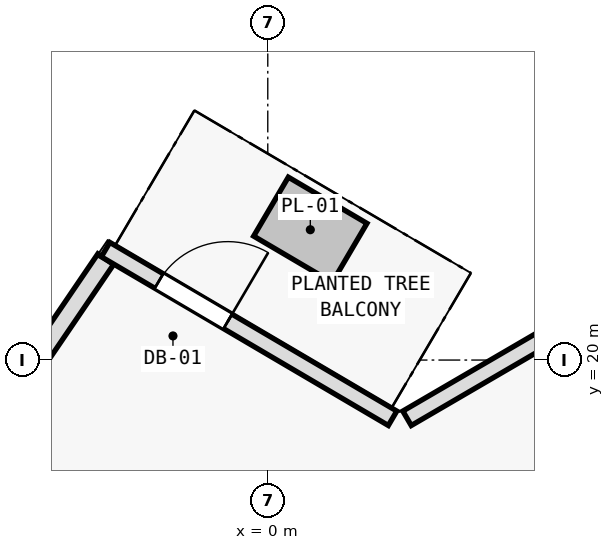
"""IFC4 building model, lengths in metres.
Left out: names, types, materials, properties, quantities, classifications, styles, units other than length and angle.
Written with IfcOpenShell. Run it as: python <this file> out.ifc"""

import sys

from ifc_helpers import new_model, si_unit, direction, frame, frame_2d, origin, place, context, subcontext, project, spatial, rectangle, extrude, element, fill, save


model = new_model("IFC4")
c1 = context("Model", 3, precision=1e-05, world=origin(), true_north=direction((0.0, 1.0)))
c2 = subcontext(c1, "Body", "Model", "MODEL_VIEW")
j1 = project(units=[si_unit("LENGTHUNIT", "METRE"), si_unit("PLANEANGLEUNIT", "RADIAN")], contexts=[c1])
p1 = place(None, origin())
s1 = spatial("IfcSite", under=j1, at=p1, CompositionType="ELEMENT")
p2 = place(p1, origin())
s2 = spatial("IfcBuilding", under=s1, at=p2, CompositionType="ELEMENT")
p3 = place(p2, frame((0.0, 0.0, 261.6)))
s3 = spatial("IfcBuildingStorey", under=s2, at=p3, CompositionType="ELEMENT", Elevation=261.6)
p4 = place(p3, frame((-7.817, 12.971, 0.0), z_axis=(0.0, 0.0, 1.0), x_axis=(0.562474530687, 0.826814611826, 0.0)))
e1 = element("IfcWall", 1, at=p4, inside=s3, PredefinedType="SOLIDWALL", context=c2, shape_type="SweptSolid", body=[
    extrude(rectangle(XDim=10.107, YDim=0.25, at=frame_2d((5.053, 0.0))), origin(), (0.0, 0.0, 1.0), 3.35),
])
p5 = place(p4, frame((4.154, 0.0, 0.62)))
e2 = element("IfcOpeningElement", 2, at=p5, cuts=e1, PredefinedType="OPENING", context=c2, shape_type="SweptSolid", body=[
    extrude(rectangle(XDim=1.8, YDim=2.1, at=frame_2d((0.9, 1.05))), frame((0.0, 0.135, 0.0), z_axis=(0.0, -1.0, 0.0), x_axis=(1.0, 0.0, 0.0)), (0.0, 0.0, 1.0), 0.27),
])
p6 = place(p3, frame((1.832, 19.234, 0.0), z_axis=(0.0, 0.0, 1.0), x_axis=(0.86397765749, 0.503530145432, 0.0)))
e3 = element("IfcWall", 3, at=p6, inside=s3, PredefinedType="SOLIDWALL", context=c2, shape_type="SweptSolid", body=[
    extrude(rectangle(XDim=3.964, YDim=0.22, at=frame_2d((1.982, 0.0))), origin(), (0.0, 0.0, 1.0), 3.35),
])
p7 = place(p3, frame((-2.134, 21.453, 0.0), z_axis=(0.0, 0.0, 1.0), x_axis=(0.862106131527, -0.506727755292, 0.0)))
e4 = element("IfcWall", 4, at=p7, inside=s3, PredefinedType="SOLIDWALL", context=c2, shape_type="SweptSolid", body=[
    extrude(rectangle(XDim=4.38, YDim=0.22, at=frame_2d((2.19, 0.0))), origin(), (0.0, 0.0, 1.0), 3.35),
])
p8 = place(p7, frame((0.815, 0.0, 0.0)))
e5 = element("IfcOpeningElement", 5, at=p8, cuts=e4, PredefinedType="OPENING", context=c2, shape_type="SweptSolid", body=[
    extrude(rectangle(XDim=1.05, YDim=2.15, at=frame_2d((0.525, 1.075))), frame((0.0, 0.12, 0.0), z_axis=(0.0, -1.0, 0.0), x_axis=(1.0, 0.0, 0.0)), (0.0, 0.0, 1.0), 0.24),
])
p9 = place(p8, origin())
e6 = element("IfcDoor", 6, at=p9, inside=s3, OperationType="SINGLE_SWING_RIGHT", PredefinedType="DOOR", context=c2, shape_type="SweptSolid", body=[
    extrude(rectangle(XDim=1.05, YDim=2.15, at=frame_2d((0.525, 1.075))), frame((0.0, 0.025, 0.0), z_axis=(0.0, -1.0, 0.0), x_axis=(1.0, 0.0, 0.0)), (0.0, 0.0, 1.0), 0.05),
])
fill(e5, e6)
save(model, sys.argv[1])
